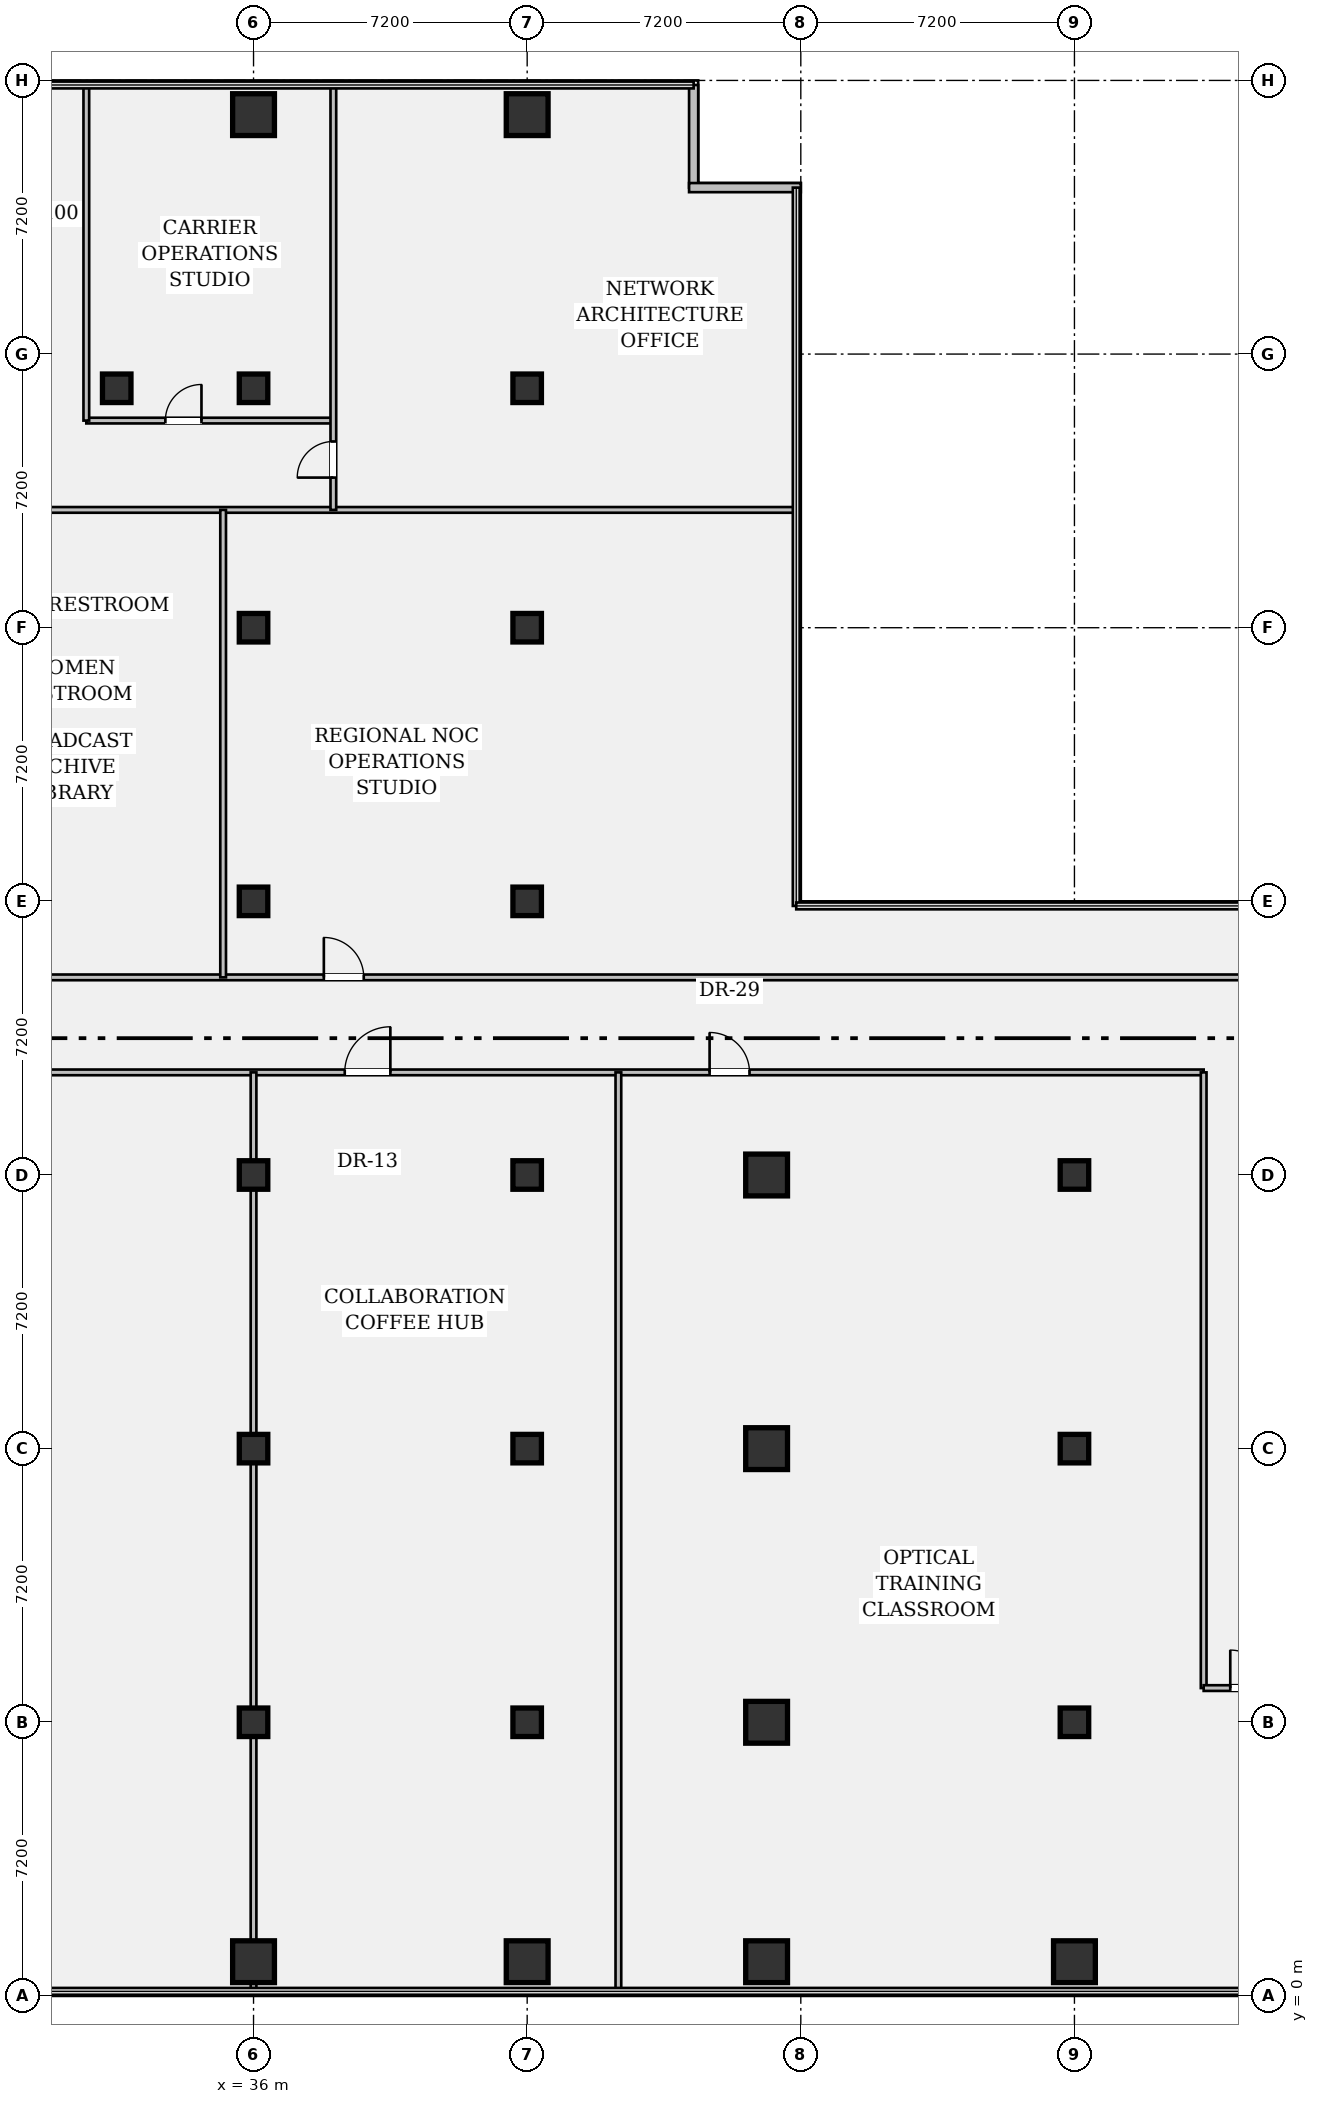
"""IFC4 building model, lengths in metres.
Left out: names, types, materials, properties, quantities, classifications, styles, units other than length and angle.
Written with IfcOpenShell. Run it as: python <this file> out.ifc"""

import sys

from ifc_helpers import new_model, si_unit, direction, frame, frame_2d, origin, origin_2d, place, context, subcontext, project, spatial, rectangle, hollow_rectangle, extrude, element, fill, save


model = new_model("IFC4")
c1 = context("Model", 3, precision=1e-05, world=origin(), true_north=direction((0.0, 1.0)))
c2 = subcontext(c1, "Body", "Model", "MODEL_VIEW")
j1 = project(units=[si_unit("LENGTHUNIT", "METRE"), si_unit("PLANEANGLEUNIT", "RADIAN")], contexts=[c1])
p1 = place(None, origin())
s1 = spatial("IfcSite", under=j1, at=p1, CompositionType="ELEMENT")
p2 = place(p1, origin())
s2 = spatial("IfcBuilding", under=s1, at=p2, CompositionType="ELEMENT")
p3 = place(p2, frame((0.0, 0.0, 22.05)))
s3 = spatial("IfcBuildingStorey", under=s2, at=p3, CompositionType="ELEMENT", Elevation=22.05)
p4 = place(p3, frame((32.4, 42.3, 0.0), z_axis=(0.0, 0.0, 1.0), x_axis=(1.0, 0.0, 0.0)))
e1 = element("IfcColumn", 1, at=p4, inside=s3, PredefinedType="COLUMN", context=c2, shape_type="SweptSolid", body=[
    extrude(rectangle(XDim=0.75, YDim=0.75, at=origin_2d()), origin(), (0.0, 0.0, 1.0), 3.9),
])
p5 = place(p3, frame((36.0, 0.9, 0.0), z_axis=(0.0, 0.0, 1.0), x_axis=(1.0, 0.0, 0.0)))
e2 = element("IfcColumn", 2, at=p5, inside=s3, PredefinedType="COLUMN", context=c2, shape_type="SweptSolid", body=[
    extrude(hollow_rectangle(XDim=1.1, YDim=1.1, WallThickness=0.07, at=origin_2d()), origin(), (0.0, 0.0, 1.0), 3.9),
])
for number, where, z_axis, x_axis in (
    (3, (36.0, 7.2, 0.0), (0.0, 0.0, 1.0), (1.0, 0.0, 0.0)),
    (4, (36.0, 14.4, 0.0), (0.0, 0.0, 1.0), (1.0, 0.0, 0.0)),
    (5, (36.0, 21.6, 0.0), (0.0, 0.0, 1.0), (1.0, 0.0, 0.0)),
    (6, (36.0, 28.8, 0.0), (0.0, 0.0, 1.0), (1.0, 0.0, 0.0)),
    (7, (36.0, 36.0, 0.0), (0.0, 0.0, 1.0), (1.0, 0.0, 0.0)),
    (8, (36.0, 42.3, 0.0), (0.0, 0.0, 1.0), (1.0, 0.0, 0.0)),
):
    element("IfcColumn", number, at=place(p3, frame(where, z_axis=z_axis, x_axis=x_axis)), inside=s3, PredefinedType="COLUMN", context=c2, shape_type="SweptSolid", body=[
        extrude(rectangle(XDim=0.75, YDim=0.75, at=origin_2d()), origin(), (0.0, 0.0, 1.0), 3.9),
    ])
for number, where, z_axis, x_axis in (
    (9, (36.0, 49.5, 0.0), (0.0, 0.0, 1.0), (1.0, 0.0, 0.0)),
    (10, (43.2, 0.9, 0.0), (0.0, 0.0, 1.0), (1.0, 0.0, 0.0)),
):
    element("IfcColumn", number, at=place(p3, frame(where, z_axis=z_axis, x_axis=x_axis)), inside=s3, PredefinedType="COLUMN", context=c2, shape_type="SweptSolid", body=[
        extrude(hollow_rectangle(XDim=1.1, YDim=1.1, WallThickness=0.07, at=origin_2d()), origin(), (0.0, 0.0, 1.0), 3.9),
    ])
for number, where, z_axis, x_axis in (
    (11, (43.2, 7.2, 0.0), (0.0, 0.0, 1.0), (1.0, 0.0, 0.0)),
    (12, (43.2, 14.4, 0.0), (0.0, 0.0, 1.0), (1.0, 0.0, 0.0)),
    (13, (43.2, 21.6, 0.0), (0.0, 0.0, 1.0), (1.0, 0.0, 0.0)),
    (14, (43.2, 28.8, 0.0), (0.0, 0.0, 1.0), (1.0, 0.0, 0.0)),
    (15, (43.2, 36.0, 0.0), (0.0, 0.0, 1.0), (1.0, 0.0, 0.0)),
    (16, (43.2, 42.3, 0.0), (0.0, 0.0, 1.0), (1.0, 0.0, 0.0)),
):
    element("IfcColumn", number, at=place(p3, frame(where, z_axis=z_axis, x_axis=x_axis)), inside=s3, PredefinedType="COLUMN", context=c2, shape_type="SweptSolid", body=[
        extrude(rectangle(XDim=0.75, YDim=0.75, at=origin_2d()), origin(), (0.0, 0.0, 1.0), 3.9),
    ])
for number, where, z_axis, x_axis in (
    (17, (43.2, 49.5, 0.0), (0.0, 0.0, 1.0), (1.0, 0.0, 0.0)),
    (18, (49.5, 0.9, 0.0), (0.0, 0.0, 1.0), (1.0, 0.0, 0.0)),
    (19, (49.5, 7.2, 0.0), (0.0, 0.0, 1.0), (1.0, 0.0, 0.0)),
    (20, (49.5, 14.4, 0.0), (0.0, 0.0, 1.0), (1.0, 0.0, 0.0)),
    (21, (49.5, 21.6, 0.0), (0.0, 0.0, 1.0), (1.0, 0.0, 0.0)),
    (22, (57.6, 0.9, 0.0), (0.0, 0.0, 1.0), (1.0, 0.0, 0.0)),
):
    element("IfcColumn", number, at=place(p3, frame(where, z_axis=z_axis, x_axis=x_axis)), inside=s3, PredefinedType="COLUMN", context=c2, shape_type="SweptSolid", body=[
        extrude(hollow_rectangle(XDim=1.1, YDim=1.1, WallThickness=0.07, at=origin_2d()), origin(), (0.0, 0.0, 1.0), 3.9),
    ])
for number, where, z_axis, x_axis in (
    (23, (57.6, 7.2, 0.0), (0.0, 0.0, 1.0), (1.0, 0.0, 0.0)),
    (24, (57.6, 14.4, 0.0), (0.0, 0.0, 1.0), (1.0, 0.0, 0.0)),
    (25, (57.6, 21.6, 0.0), (0.0, 0.0, 1.0), (1.0, 0.0, 0.0)),
):
    element("IfcColumn", number, at=place(p3, frame(where, z_axis=z_axis, x_axis=x_axis)), inside=s3, PredefinedType="COLUMN", context=c2, shape_type="SweptSolid", body=[
        extrude(rectangle(XDim=0.75, YDim=0.75, at=origin_2d()), origin(), (0.0, 0.0, 1.0), 3.9),
    ])
p6 = place(p3, frame((47.58, 50.28, 0.0), z_axis=(0.0, 0.0, 1.0), x_axis=(0.0, -1.0, 0.0)))
e26 = element("IfcWall", 26, at=p6, inside=s3, PredefinedType="STANDARD", context=c2, shape_type="SweptSolid", body=[
    extrude(rectangle(XDim=2.7, YDim=0.24, at=frame_2d((1.35, 0.0))), origin(), (0.0, 0.0, 1.0), 3.9),
])
p7 = place(p3, frame((47.46, 47.58, 0.0), z_axis=(0.0, 0.0, 1.0), x_axis=(1.0, 0.0, 0.0)))
e27 = element("IfcWall", 27, at=p7, inside=s3, PredefinedType="STANDARD", context=c2, shape_type="SweptSolid", body=[
    extrude(rectangle(XDim=2.94, YDim=0.24, at=frame_2d((1.47, 0.0))), origin(), (0.0, 0.0, 1.0), 3.9),
])
p8 = place(p3, frame((31.6, 41.45, 0.0), z_axis=(0.0, 0.0, 1.0), x_axis=(1.0, 0.0, 0.0)))
e28 = element("IfcWall", 28, at=p8, inside=s3, PredefinedType="PARTITIONING", context=c2, shape_type="SweptSolid", body=[
    extrude(rectangle(XDim=6.5, YDim=0.15, at=frame_2d((3.25, 0.0))), origin(), (0.0, 0.0, 1.0), 2.958),
])
p9 = place(p8, frame((2.08, 0.0, 0.0)))
e29 = element("IfcOpeningElement", 29, at=p9, cuts=e28, PredefinedType="OPENING", context=c2, shape_type="SweptSolid", body=[
    extrude(rectangle(XDim=0.95, YDim=2.15, at=frame_2d((0.475, 1.075))), frame((0.0, 0.087, 0.0), z_axis=(0.0, -1.0, 0.0), x_axis=(1.0, 0.0, 0.0)), (0.0, 0.0, 1.0), 0.174),
])
p10 = place(p3, frame((17.45, 39.1, 0.0), z_axis=(0.0, 0.0, 1.0), x_axis=(1.0, 0.0, 0.0)))
e30 = element("IfcWall", 30, at=p10, inside=s3, PredefinedType="PARTITIONING", context=c2, shape_type="SweptSolid", body=[
    extrude(rectangle(XDim=32.83, YDim=0.15, at=frame_2d((16.415, 0.0))), origin(), (0.0, 0.0, 1.0), 2.958),
])
p11 = place(p3, frame((31.6, 41.45, 0.0), z_axis=(0.0, 0.0, 1.0), x_axis=(0.0, 1.0, 0.0)))
e31 = element("IfcWall", 31, at=p11, inside=s3, PredefinedType="PARTITIONING", context=c2, shape_type="SweptSolid", body=[
    extrude(rectangle(XDim=8.83, YDim=0.15, at=frame_2d((4.415, 0.0))), origin(), (0.0, 0.0, 1.0), 2.958),
])
p12 = place(p3, frame((38.1, 39.1, 0.0), z_axis=(0.0, 0.0, 1.0), x_axis=(0.0, 1.0, 0.0)))
e32 = element("IfcWall", 32, at=p12, inside=s3, PredefinedType="PARTITIONING", context=c2, shape_type="SweptSolid", body=[
    extrude(rectangle(XDim=11.18, YDim=0.15, at=frame_2d((5.59, 0.0))), origin(), (0.0, 0.0, 1.0), 2.958),
])
p13 = place(p12, frame((0.85, 0.0, 0.0)))
e33 = element("IfcOpeningElement", 33, at=p13, cuts=e32, PredefinedType="OPENING", context=c2, shape_type="SweptSolid", body=[
    extrude(rectangle(XDim=0.95, YDim=2.15, at=frame_2d((0.475, 1.075))), frame((0.0, 0.087, 0.0), z_axis=(0.0, -1.0, 0.0), x_axis=(1.0, 0.0, 0.0)), (0.0, 0.0, 1.0), 0.174),
])
p14 = place(p3, frame((17.45, 24.3, 0.0), z_axis=(0.0, 0.0, 1.0), x_axis=(1.0, 0.0, 0.0)))
e34 = element("IfcWall", 34, at=p14, inside=s3, PredefinedType="PARTITIONING", context=c2, shape_type="SweptSolid", body=[
    extrude(rectangle(XDim=43.55, YDim=0.15, at=frame_2d((21.775, 0.0))), origin(), (0.0, 0.0, 1.0), 2.958),
])
p15 = place(p14, frame((3.2, 0.0, 0.0)))
e35 = element("IfcOpeningElement", 35, at=p15, cuts=e34, PredefinedType="OPENING", context=c2, shape_type="SweptSolid", body=[
    extrude(rectangle(XDim=1.2, YDim=2.15, at=frame_2d((0.6, 1.075))), frame((0.0, 0.087, 0.0), z_axis=(0.0, -1.0, 0.0), x_axis=(1.0, 0.0, 0.0)), (0.0, 0.0, 1.0), 0.174),
])
p16 = place(p14, frame((20.95, 0.0, 0.0)))
e36 = element("IfcOpeningElement", 36, at=p16, cuts=e34, PredefinedType="OPENING", context=c2, shape_type="SweptSolid", body=[
    extrude(rectangle(XDim=1.2, YDim=2.15, at=frame_2d((0.6, 1.075))), frame((0.0, 0.087, 0.0), z_axis=(0.0, -1.0, 0.0), x_axis=(1.0, 0.0, 0.0)), (0.0, 0.0, 1.0), 0.174),
])
p17 = place(p14, frame((30.55, 0.0, 0.0)))
e37 = element("IfcOpeningElement", 37, at=p17, cuts=e34, PredefinedType="OPENING", context=c2, shape_type="SweptSolid", body=[
    extrude(rectangle(XDim=1.05, YDim=2.15, at=frame_2d((0.525, 1.075))), frame((0.0, 0.087, 0.0), z_axis=(0.0, -1.0, 0.0), x_axis=(1.0, 0.0, 0.0)), (0.0, 0.0, 1.0), 0.174),
])
p18 = place(p3, frame((17.45, 26.8, 0.0), z_axis=(0.0, 0.0, 1.0), x_axis=(1.0, 0.0, 0.0)))
e38 = element("IfcWall", 38, at=p18, inside=s3, PredefinedType="PARTITIONING", context=c2, shape_type="SweptSolid", body=[
    extrude(rectangle(XDim=68.83, YDim=0.15, at=frame_2d((34.415, 0.0))), origin(), (0.0, 0.0, 1.0), 2.958),
])
p19 = place(p18, frame((6.2, 0.0, 0.0)))
e39 = element("IfcOpeningElement", 39, at=p19, cuts=e38, PredefinedType="OPENING", context=c2, shape_type="SweptSolid", body=[
    extrude(rectangle(XDim=1.05, YDim=2.15, at=frame_2d((0.525, 1.075))), frame((0.0, 0.087, 0.0), z_axis=(0.0, -1.0, 0.0), x_axis=(1.0, 0.0, 0.0)), (0.0, 0.0, 1.0), 0.174),
])
p20 = place(p18, frame((20.4, 0.0, 0.0)))
e40 = element("IfcOpeningElement", 40, at=p20, cuts=e38, PredefinedType="OPENING", context=c2, shape_type="SweptSolid", body=[
    extrude(rectangle(XDim=1.05, YDim=2.15, at=frame_2d((0.525, 1.075))), frame((0.0, 0.087, 0.0), z_axis=(0.0, -1.0, 0.0), x_axis=(1.0, 0.0, 0.0)), (0.0, 0.0, 1.0), 0.174),
])
p21 = place(p3, frame((61.0, 8.1, 0.0), z_axis=(0.0, 0.0, 1.0), x_axis=(0.0, 1.0, 0.0)))
e41 = element("IfcWall", 41, at=p21, inside=s3, PredefinedType="PARTITIONING", context=c2, shape_type="SweptSolid", body=[
    extrude(rectangle(XDim=16.2, YDim=0.15, at=frame_2d((8.1, 0.0))), origin(), (0.0, 0.0, 1.0), 2.958),
])
p22 = place(p3, frame((61.0, 8.1, 0.0), z_axis=(0.0, 0.0, 1.0), x_axis=(1.0, 0.0, 0.0)))
e42 = element("IfcWall", 42, at=p22, inside=s3, PredefinedType="PARTITIONING", context=c2, shape_type="SweptSolid", body=[
    extrude(rectangle(XDim=25.28, YDim=0.15, at=frame_2d((12.64, 0.0))), origin(), (0.0, 0.0, 1.0), 2.958),
])
p23 = place(p22, frame((0.7, 0.0, 0.0)))
e43 = element("IfcOpeningElement", 43, at=p23, cuts=e42, PredefinedType="OPENING", context=c2, shape_type="SweptSolid", body=[
    extrude(rectangle(XDim=1.0, YDim=2.15, at=frame_2d((0.5, 1.075))), frame((0.0, 0.087, 0.0), z_axis=(0.0, -1.0, 0.0), x_axis=(1.0, 0.0, 0.0)), (0.0, 0.0, 1.0), 0.174),
])
for number, where, z_axis, x_axis in (
    (44, (36.0, 0.12, 0.0), (0.0, 0.0, 1.0), (0.0, 1.0, 0.0)),
    (45, (45.6, 0.12, 0.0), (0.0, 0.0, 1.0), (0.0, 1.0, 0.0)),
):
    element("IfcWall", number, at=place(p3, frame(where, z_axis=z_axis, x_axis=x_axis)), inside=s3, PredefinedType="PARTITIONING", context=c2, shape_type="SweptSolid", body=[
        extrude(rectangle(XDim=24.18, YDim=0.15, at=frame_2d((12.09, 0.0))), origin(), (0.0, 0.0, 1.0), 2.958),
    ])
p24 = place(p3, frame((35.2, 26.8, 0.0), z_axis=(0.0, 0.0, 1.0), x_axis=(0.0, 1.0, 0.0)))
e46 = element("IfcWall", 46, at=p24, inside=s3, PredefinedType="PARTITIONING", context=c2, shape_type="SweptSolid", body=[
    extrude(rectangle(XDim=12.3, YDim=0.15, at=frame_2d((6.15, 0.0))), origin(), (0.0, 0.0, 1.0), 2.958),
])
p25 = place(p16, origin())
e47 = element("IfcDoor", 47, at=p25, inside=s3, OperationType="SINGLE_SWING_RIGHT", PredefinedType="DOOR", context=c2, shape_type="SweptSolid", body=[
    extrude(rectangle(XDim=1.2, YDim=2.15, at=frame_2d((0.6, 1.075))), frame((0.0, 0.025, 0.0), z_axis=(0.0, -1.0, 0.0), x_axis=(1.0, 0.0, 0.0)), (0.0, 0.0, 1.0), 0.05),
])
fill(e36, e47)
p26 = place(p17, origin())
e48 = element("IfcDoor", 48, at=p26, inside=s3, OperationType="SINGLE_SWING_LEFT", PredefinedType="DOOR", context=c2, shape_type="SweptSolid", body=[
    extrude(rectangle(XDim=1.05, YDim=2.15, at=frame_2d((0.525, 1.075))), frame((0.0, 0.025, 0.0), z_axis=(0.0, -1.0, 0.0), x_axis=(1.0, 0.0, 0.0)), (0.0, 0.0, 1.0), 0.05),
])
fill(e37, e48)
p27 = place(p20, origin())
e49 = element("IfcDoor", 49, at=p27, inside=s3, OperationType="SINGLE_SWING_LEFT", PredefinedType="DOOR", context=c2, shape_type="SweptSolid", body=[
    extrude(rectangle(XDim=1.05, YDim=2.15, at=frame_2d((0.525, 1.075))), frame((0.0, 0.025, 0.0), z_axis=(0.0, -1.0, 0.0), x_axis=(1.0, 0.0, 0.0)), (0.0, 0.0, 1.0), 0.05),
])
fill(e40, e49)
p28 = place(p9, origin())
e50 = element("IfcDoor", 50, at=p28, inside=s3, OperationType="SINGLE_SWING_RIGHT", PredefinedType="DOOR", context=c2, shape_type="SweptSolid", body=[
    extrude(rectangle(XDim=0.95, YDim=2.15, at=frame_2d((0.475, 1.075))), frame((0.0, 0.025, 0.0), z_axis=(0.0, -1.0, 0.0), x_axis=(1.0, 0.0, 0.0)), (0.0, 0.0, 1.0), 0.05),
])
fill(e29, e50)
p29 = place(p13, origin())
e51 = element("IfcDoor", 51, at=p29, inside=s3, OperationType="SINGLE_SWING_LEFT", PredefinedType="DOOR", context=c2, shape_type="SweptSolid", body=[
    extrude(rectangle(XDim=0.95, YDim=2.15, at=frame_2d((0.475, 1.075))), frame((0.0, 0.025, 0.0), z_axis=(0.0, -1.0, 0.0), x_axis=(1.0, 0.0, 0.0)), (0.0, 0.0, 1.0), 0.05),
])
fill(e33, e51)
p30 = place(p23, origin())
e52 = element("IfcDoor", 52, at=p30, inside=s3, OperationType="SINGLE_SWING_LEFT", PredefinedType="DOOR", context=c2, shape_type="SweptSolid", body=[
    extrude(rectangle(XDim=1.0, YDim=2.15, at=frame_2d((0.5, 1.075))), frame((0.0, 0.025, 0.0), z_axis=(0.0, -1.0, 0.0), x_axis=(1.0, 0.0, 0.0)), (0.0, 0.0, 1.0), 0.05),
])
fill(e43, e52)
save(model, sys.argv[1])
